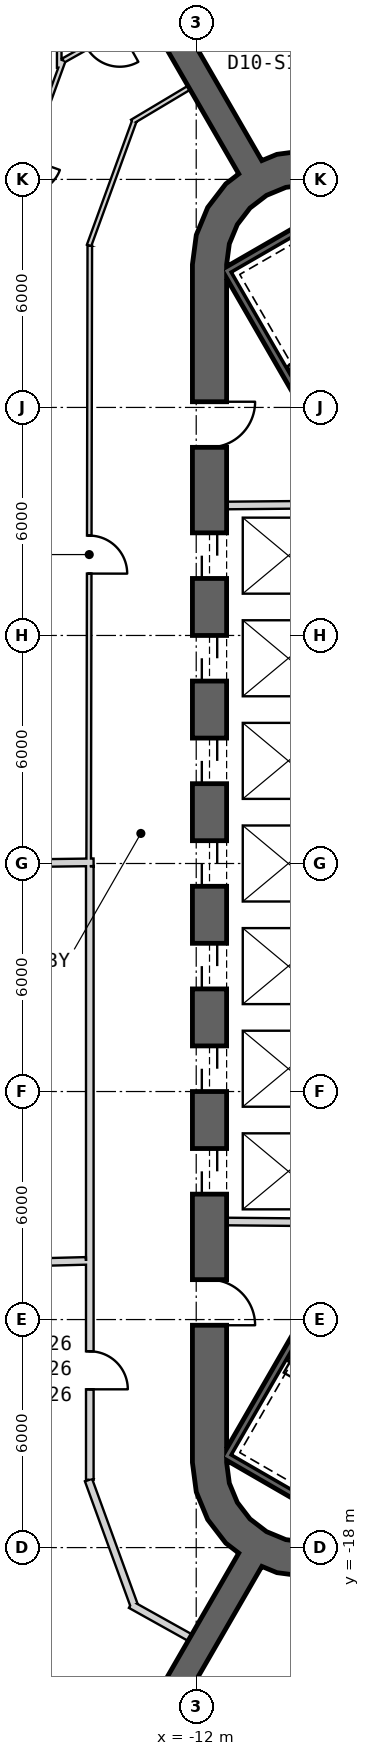
"""IFC4 building model, lengths in metres.
Left out: names, types, materials, properties, quantities, classifications, styles, units other than length and angle.
Written with IfcOpenShell. Run it as: python <this file> out.ifc"""

import sys

from ifc_helpers import new_model, si_unit, direction, frame, frame_2d, origin, place, context, subcontext, project, spatial, polyline, rectangle, outline, extrude, element, fill, save


model = new_model("IFC4")
c1 = context("Model", 3, precision=1e-05, world=origin(), true_north=direction((0.0, 1.0)))
c2 = subcontext(c1, "Body", "Model", "MODEL_VIEW")
j1 = project(units=[si_unit("LENGTHUNIT", "METRE"), si_unit("PLANEANGLEUNIT", "RADIAN")], contexts=[c1])
p1 = place(None, origin())
s1 = spatial("IfcSite", under=j1, at=p1, CompositionType="ELEMENT")
p2 = place(p1, origin())
s2 = spatial("IfcBuilding", under=s1, at=p2, CompositionType="ELEMENT")
p3 = place(p2, frame((0.0, 0.0, 217.2)))
s3 = spatial("IfcBuildingStorey", under=s2, at=p3, CompositionType="ELEMENT", Elevation=217.2)
p4 = place(p3, frame((-11.65, 15.762, 0.0), z_axis=(0.0, 0.0, 1.0), x_axis=(0.0, -1.0, 0.0)))
e1 = element("IfcWall", 1, at=p4, inside=s3, PredefinedType="SHEAR", context=c2, shape_type="SweptSolid", body=[
    extrude(rectangle(XDim=31.523, YDim=0.9, at=frame_2d((15.762, 0.0))), origin(), (0.0, 0.0, 1.0), 4.0),
])
p5 = place(p4, frame((7.062, 0.0, 0.0)))
e2 = element("IfcOpeningElement", 2, at=p5, cuts=e1, PredefinedType="OPENING", context=c2, shape_type="SweptSolid", body=[
    extrude(rectangle(XDim=1.2, YDim=2.4, at=frame_2d((0.6, 1.2))), frame((0.0, 0.46, 0.0), z_axis=(0.0, -1.0, 0.0), x_axis=(1.0, 0.0, 0.0)), (0.0, 0.0, 1.0), 0.92),
])
p6 = place(p4, frame((9.762, 0.0, 0.0)))
e3 = element("IfcOpeningElement", 3, at=p6, cuts=e1, PredefinedType="OPENING", context=c2, shape_type="SweptSolid", body=[
    extrude(rectangle(XDim=1.2, YDim=2.4, at=frame_2d((0.6, 1.2))), frame((0.0, 0.46, 0.0), z_axis=(0.0, -1.0, 0.0), x_axis=(1.0, 0.0, 0.0)), (0.0, 0.0, 1.0), 0.92),
])
p7 = place(p4, frame((12.462, 0.0, 0.0)))
e4 = element("IfcOpeningElement", 4, at=p7, cuts=e1, PredefinedType="OPENING", context=c2, shape_type="SweptSolid", body=[
    extrude(rectangle(XDim=1.2, YDim=2.4, at=frame_2d((0.6, 1.2))), frame((0.0, 0.46, 0.0), z_axis=(0.0, -1.0, 0.0), x_axis=(1.0, 0.0, 0.0)), (0.0, 0.0, 1.0), 0.92),
])
p8 = place(p4, frame((15.162, 0.0, 0.0)))
e5 = element("IfcOpeningElement", 5, at=p8, cuts=e1, PredefinedType="OPENING", context=c2, shape_type="SweptSolid", body=[
    extrude(rectangle(XDim=1.2, YDim=2.4, at=frame_2d((0.6, 1.2))), frame((0.0, 0.46, 0.0), z_axis=(0.0, -1.0, 0.0), x_axis=(1.0, 0.0, 0.0)), (0.0, 0.0, 1.0), 0.92),
])
p9 = place(p4, frame((17.862, 0.0, 0.0)))
e6 = element("IfcOpeningElement", 6, at=p9, cuts=e1, PredefinedType="OPENING", context=c2, shape_type="SweptSolid", body=[
    extrude(rectangle(XDim=1.2, YDim=2.4, at=frame_2d((0.6, 1.2))), frame((0.0, 0.46, 0.0), z_axis=(0.0, -1.0, 0.0), x_axis=(1.0, 0.0, 0.0)), (0.0, 0.0, 1.0), 0.92),
])
p10 = place(p4, frame((20.562, 0.0, 0.0)))
e7 = element("IfcOpeningElement", 7, at=p10, cuts=e1, PredefinedType="OPENING", context=c2, shape_type="SweptSolid", body=[
    extrude(rectangle(XDim=1.2, YDim=2.4, at=frame_2d((0.6, 1.2))), frame((0.0, 0.46, 0.0), z_axis=(0.0, -1.0, 0.0), x_axis=(1.0, 0.0, 0.0)), (0.0, 0.0, 1.0), 0.92),
])
p11 = place(p4, frame((23.262, 0.0, 0.0)))
e8 = element("IfcOpeningElement", 8, at=p11, cuts=e1, PredefinedType="OPENING", context=c2, shape_type="SweptSolid", body=[
    extrude(rectangle(XDim=1.2, YDim=2.4, at=frame_2d((0.6, 1.2))), frame((0.0, 0.46, 0.0), z_axis=(0.0, -1.0, 0.0), x_axis=(1.0, 0.0, 0.0)), (0.0, 0.0, 1.0), 0.92),
])
p12 = place(p4, frame((3.612, 0.0, 0.0)))
e9 = element("IfcOpeningElement", 9, at=p12, cuts=e1, PredefinedType="OPENING", context=c2, shape_type="SweptSolid", body=[
    extrude(rectangle(XDim=1.2, YDim=2.4, at=frame_2d((0.6, 1.2))), frame((0.0, 0.46, 0.0), z_axis=(0.0, -1.0, 0.0), x_axis=(1.0, 0.0, 0.0)), (0.0, 0.0, 1.0), 0.92),
])
p13 = place(p4, frame((26.712, 0.0, 0.0)))
e10 = element("IfcOpeningElement", 10, at=p13, cuts=e1, PredefinedType="OPENING", context=c2, shape_type="SweptSolid", body=[
    extrude(rectangle(XDim=1.2, YDim=2.4, at=frame_2d((0.6, 1.2))), frame((0.0, 0.46, 0.0), z_axis=(0.0, -1.0, 0.0), x_axis=(1.0, 0.0, 0.0)), (0.0, 0.0, 1.0), 0.92),
])
p14 = place(p3, origin())
e11 = element("IfcWall", 11, at=p14, inside=s3, PredefinedType="SHEAR", context=c2, shape_type="SweptSolid", body=[
    extrude(outline(polyline([(-7.6, 18.36), (-8.323, 18.659), (-9.1, 18.762), (-9.876, 18.659), (-10.6, 18.36), (-11.221, 17.883), (-11.698, 17.262), (-11.998, 16.538), (-12.1, 15.762), (-11.2, 15.762), (-11.128, 16.305), (-10.919, 16.812), (-10.585, 17.247), (-10.15, 17.58), (-9.644, 17.79), (-9.1, 17.862), (-8.556, 17.79), (-8.05, 17.58), (-7.6, 18.36)])), origin(), (0.0, 0.0, 1.0), 4.0),
])
p15 = place(p3, origin())
e12 = element("IfcWall", 12, at=p15, inside=s3, PredefinedType="SHEAR", context=c2, shape_type="SweptSolid", body=[
    extrude(outline(polyline([(-12.1, -15.762), (-11.998, -16.538), (-11.698, -17.262), (-11.221, -17.883), (-10.6, -18.36), (-9.876, -18.659), (-9.1, -18.762), (-8.323, -18.659), (-7.6, -18.36), (-8.05, -17.58), (-8.556, -17.79), (-9.1, -17.862), (-9.644, -17.79), (-10.15, -17.58), (-10.585, -17.247), (-10.919, -16.812), (-11.128, -16.305), (-11.2, -15.762), (-12.1, -15.762)])), origin(), (0.0, 0.0, 1.0), 4.0),
])
for number, where, z_axis, x_axis in (
    (13, (-10.575, 18.316, 0.0), (0.0, 0.0, 1.0), (-0.5, 0.866, 0.0)),
    (14, (-10.575, -18.316, 0.0), (0.0, 0.0, 1.0), (-0.5, -0.866, 0.0)),
):
    element("IfcWall", number, at=place(p3, frame(where, z_axis=z_axis, x_axis=x_axis)), inside=s3, PredefinedType="SHEAR", context=c2, shape_type="SweptSolid", body=[
        extrude(rectangle(XDim=11.581, YDim=0.7, at=frame_2d((5.791, 0.0))), origin(), (0.0, 0.0, 1.0), 4.0),
    ])
p16 = place(p3, frame((-11.2, 9.42, 0.0), z_axis=(0.0, 0.0, 1.0), x_axis=(0.999957167047, 0.009255488683, 0.0)))
e15 = element("IfcWall", 15, at=p16, inside=s3, PredefinedType="PLUMBINGWALL", context=c2, shape_type="SweptSolid", body=[
    extrude(rectangle(XDim=3.35, YDim=0.2, at=frame_2d((1.675, 0.0))), origin(), (0.0, 0.0, 1.0), 3.7),
])
p17 = place(p3, frame((-8.05, -9.449, 0.0), z_axis=(0.0, 0.0, 1.0), x_axis=(-0.999957467379, 0.009222983926, 0.0)))
e16 = element("IfcWall", 16, at=p17, inside=s3, PredefinedType="PLUMBINGWALL", context=c2, shape_type="SweptSolid", body=[
    extrude(rectangle(XDim=3.15, YDim=0.2, at=frame_2d((1.575, 0.0))), origin(), (0.0, 0.0, 1.0), 3.7),
])
p18 = place(p3, frame((-11.245, 15.678, -0.3), z_axis=(0.0, 0.0, 1.0), x_axis=(0.499977274689, -0.866038523851, 0.0)))
e17 = element("IfcWall", 17, at=p18, inside=s3, PredefinedType="SHEAR", context=c2, shape_type="SweptSolid", body=[
    extrude(rectangle(XDim=8.1, YDim=0.2, at=frame_2d((4.05, 0.0))), origin(), (0.0, 0.0, 1.0), 4.0),
])
for number, where, z_axis, x_axis in (
    (18, (-7.818, 17.541, -0.3), (0.0, 0.0, 1.0), (-0.866, -0.5, 0.0)),
    (19, (-11.282, -15.541, -0.3), (0.0, 0.0, 1.0), (0.866, -0.5, 0.0)),
):
    element("IfcWall", number, at=place(p3, frame(where, z_axis=z_axis, x_axis=x_axis)), inside=s3, PredefinedType="SHEAR", context=c2, shape_type="SweptSolid", body=[
        extrude(rectangle(XDim=3.8, YDim=0.2, at=frame_2d((1.9, 0.0))), origin(), (0.0, 0.0, 1.0), 4.0),
    ])
p19 = place(p3, frame((-7.196, -8.663, -0.3), z_axis=(0.0, 0.0, 1.0), x_axis=(-0.499997992926, -0.866026562566, 0.0)))
e20 = element("IfcWall", 20, at=p19, inside=s3, PredefinedType="SHEAR", context=c2, shape_type="SweptSolid", body=[
    extrude(rectangle(XDim=7.9, YDim=0.2, at=frame_2d((3.95, 0.0))), origin(), (0.0, 0.0, 1.0), 4.0),
])
p20 = place(p3, frame((-12.189, 20.411, 0.0), z_axis=(0.0, 0.0, 1.0), x_axis=(-0.858492721014, -0.51282574815, 0.0)))
e21 = element("IfcWall", 21, at=p20, inside=s3, PredefinedType="PARTITIONING", context=c2, shape_type="SweptSolid", body=[
    extrude(rectangle(XDim=1.742, YDim=0.12, at=frame_2d((0.871, 0.0))), origin(), (0.0, 0.0, 1.0), 3.7),
])
p21 = place(p3, frame((-13.631, 19.53, 0.0), z_axis=(0.0, 0.0, 1.0), x_axis=(-0.342069878069, -0.939674517329, 0.0)))
e22 = element("IfcWall", 22, at=p21, inside=s3, PredefinedType="PARTITIONING", context=c2, shape_type="SweptSolid", body=[
    extrude(rectangle(XDim=3.479, YDim=0.12, at=frame_2d((1.739, 0.0))), origin(), (0.0, 0.0, 1.0), 2.78),
])
p22 = place(p3, frame((-14.8, 16.257, 0.0), z_axis=(0.0, 0.0, 1.0), x_axis=(-0.001847148781, -0.999998294019, 0.0)))
e23 = element("IfcWall", 23, at=p22, inside=s3, PredefinedType="PARTITIONING", context=c2, shape_type="SweptSolid", body=[
    extrude(rectangle(XDim=16.257, YDim=0.12, at=frame_2d((8.128, 0.0))), origin(), (0.0, 0.0, 1.0), 2.88),
])
p23 = place(p22, frame((7.629, 0.0, 0.0)))
e24 = element("IfcOpeningElement", 24, at=p23, cuts=e23, PredefinedType="OPENING", context=c2, shape_type="SweptSolid", body=[
    extrude(rectangle(XDim=1.0, YDim=2.1, at=frame_2d((0.5, 1.05))), frame((0.0, 0.07, 0.0), z_axis=(0.0, -1.0, 0.0), x_axis=(1.0, 0.0, 0.0)), (0.0, 0.0, 1.0), 0.14),
])
p24 = place(p3, frame((-17.2, -0.001, 0.0), z_axis=(0.0, 0.0, 1.0), x_axis=(0.999915662945, 0.012987185857, 0.0)))
e25 = element("IfcWall", 25, at=p24, inside=s3, PredefinedType="PARTITIONING", context=c2, shape_type="SweptSolid", body=[
    extrude(rectangle(XDim=2.5, YDim=0.2, at=frame_2d((1.25, 0.0))), origin(), (0.0, 0.0, 1.0), 3.07),
])
p25 = place(p3, frame((-15.496, 21.129, 0.0), z_axis=(0.0, 0.0, 1.0), x_axis=(-0.342023613346, -0.939691357795, 0.0)))
e26 = element("IfcWall", 26, at=p25, inside=s3, PredefinedType="PARTITIONING", context=c2, shape_type="SweptSolid", body=[
    extrude(rectangle(XDim=1.747, YDim=0.12, at=frame_2d((0.873, 0.0))), origin(), (0.0, 0.0, 1.0), 2.78),
])
p26 = place(p3, frame((-13.313, 22.359, 0.0), z_axis=(0.0, 0.0, 1.0), x_axis=(-0.87126053708, -0.490820819167, 0.0)))
e27 = element("IfcWall", 27, at=p26, inside=s3, PredefinedType="PARTITIONING", context=c2, shape_type="SweptSolid", body=[
    extrude(rectangle(XDim=2.506, YDim=0.12, at=frame_2d((1.253, 0.0))), origin(), (0.0, 0.0, 1.0), 3.7),
])
p27 = place(p26, frame((0.803, 0.0, 0.0)))
e28 = element("IfcOpeningElement", 28, at=p27, cuts=e27, PredefinedType="OPENING", context=c2, shape_type="SweptSolid", body=[
    extrude(rectangle(XDim=1.0, YDim=2.1, at=frame_2d((0.5, 1.05))), frame((0.0, 0.07, 0.0), z_axis=(0.0, -1.0, 0.0), x_axis=(1.0, 0.0, 0.0)), (0.0, 0.0, 1.0), 0.14),
])
p28 = place(p3, frame((-13.722, -19.499, 0.0), z_axis=(0.0, 0.0, 1.0), x_axis=(0.873381780332, -0.487036205824, 0.0)))
e29 = element("IfcWall", 29, at=p28, inside=s3, PredefinedType="PARTITIONING", context=c2, shape_type="SweptSolid", body=[
    extrude(rectangle(XDim=1.785, YDim=0.2, at=frame_2d((0.892, 0.0))), origin(), (0.0, 0.0, 1.0), 3.7),
])
p29 = place(p3, frame((-14.834, -16.223, 0.0), z_axis=(0.0, 0.0, 1.0), x_axis=(0.342017717312, -0.939693503779, 0.0)))
e30 = element("IfcWall", 30, at=p29, inside=s3, PredefinedType="PARTITIONING", context=c2, shape_type="SweptSolid", body=[
    extrude(rectangle(XDim=3.497, YDim=0.2, at=frame_2d((1.749, 0.0))), origin(), (0.0, 0.0, 1.0), 2.78),
])
p30 = place(p3, frame((-14.8, -0.07, 0.0), z_axis=(0.0, 0.0, 1.0), x_axis=(0.0, -1.0, 0.0)))
e31 = element("IfcWall", 31, at=p30, inside=s3, PredefinedType="PARTITIONING", context=c2, shape_type="SweptSolid", body=[
    extrude(rectangle(XDim=16.147, YDim=0.2, at=frame_2d((8.073, 0.0))), origin(), (0.0, 0.0, 1.0), 2.88),
])
p31 = place(p30, frame((12.765, 0.0, 0.0)))
e32 = element("IfcOpeningElement", 32, at=p31, cuts=e31, PredefinedType="OPENING", context=c2, shape_type="SweptSolid", body=[
    extrude(rectangle(XDim=1.0, YDim=2.1, at=frame_2d((0.5, 1.05))), frame((0.0, 0.11, 0.0), z_axis=(0.0, -1.0, 0.0), x_axis=(1.0, 0.0, 0.0)), (0.0, 0.0, 1.0), 0.22),
])
p32 = place(p3, frame((-14.9, -10.456, 0.0), z_axis=(0.0, 0.0, 1.0), x_axis=(-0.999660259834, -0.026064629441, 0.0)))
e33 = element("IfcWall", 33, at=p32, inside=s3, PredefinedType="PARTITIONING", context=c2, shape_type="SweptSolid", body=[
    extrude(rectangle(XDim=14.191, YDim=0.2, at=frame_2d((7.095, 0.0))), origin(), (0.0, 0.0, 1.0), 2.98),
])
p33 = place(p3, frame((-15.605, 20.939, 0.0), z_axis=(0.0, 0.0, 1.0), x_axis=(0.001847571904, 0.999998293238, 0.0)))
e34 = element("IfcWall", 34, at=p33, inside=s3, PredefinedType="PARTITIONING", context=c2, shape_type="SweptSolid", body=[
    extrude(rectangle(XDim=2.643, YDim=0.12, at=frame_2d((1.321, 0.0))), origin(), (0.0, 0.0, 1.0), 3.7),
])
p34 = place(p23, origin())
e35 = element("IfcDoor", 35, at=p34, inside=s3, OperationType="SINGLE_SWING_RIGHT", PredefinedType="NOTDEFINED", context=c2, shape_type="SweptSolid", body=[
    extrude(rectangle(XDim=1.0, YDim=2.1, at=frame_2d((0.5, 1.05))), frame((0.0, 0.025, 0.0), z_axis=(0.0, -1.0, 0.0), x_axis=(1.0, 0.0, 0.0)), (0.0, 0.0, 1.0), 0.05),
])
fill(e24, e35)
p35 = place(p31, origin())
e36 = element("IfcDoor", 36, at=p35, inside=s3, OperationType="SINGLE_SWING_LEFT", PredefinedType="USERDEFINED", context=c2, shape_type="SweptSolid", body=[
    extrude(rectangle(XDim=1.0, YDim=2.1, at=frame_2d((0.5, 1.05))), frame((0.0, 0.025, 0.0), z_axis=(0.0, -1.0, 0.0), x_axis=(1.0, 0.0, 0.0)), (0.0, 0.0, 1.0), 0.05),
])
fill(e32, e36)
p36 = place(p5, origin())
e37 = element("IfcDoor", 37, at=p36, inside=s3, OperationType="SLIDING_TO_LEFT", PredefinedType="USERDEFINED", context=c2, shape_type="SweptSolid", body=[
    extrude(rectangle(XDim=1.2, YDim=2.4, at=frame_2d((0.6, 1.2))), frame((0.0, 0.025, 0.0), z_axis=(0.0, -1.0, 0.0), x_axis=(1.0, 0.0, 0.0)), (0.0, 0.0, 1.0), 0.05),
])
fill(e2, e37)
p37 = place(p6, origin())
e38 = element("IfcDoor", 38, at=p37, inside=s3, OperationType="SLIDING_TO_LEFT", PredefinedType="USERDEFINED", context=c2, shape_type="SweptSolid", body=[
    extrude(rectangle(XDim=1.2, YDim=2.4, at=frame_2d((0.6, 1.2))), frame((0.0, 0.025, 0.0), z_axis=(0.0, -1.0, 0.0), x_axis=(1.0, 0.0, 0.0)), (0.0, 0.0, 1.0), 0.05),
])
fill(e3, e38)
p38 = place(p7, origin())
e39 = element("IfcDoor", 39, at=p38, inside=s3, OperationType="SLIDING_TO_LEFT", PredefinedType="USERDEFINED", context=c2, shape_type="SweptSolid", body=[
    extrude(rectangle(XDim=1.2, YDim=2.4, at=frame_2d((0.6, 1.2))), frame((0.0, 0.025, 0.0), z_axis=(0.0, -1.0, 0.0), x_axis=(1.0, 0.0, 0.0)), (0.0, 0.0, 1.0), 0.05),
])
fill(e4, e39)
p39 = place(p8, origin())
e40 = element("IfcDoor", 40, at=p39, inside=s3, OperationType="SLIDING_TO_LEFT", PredefinedType="USERDEFINED", context=c2, shape_type="SweptSolid", body=[
    extrude(rectangle(XDim=1.2, YDim=2.4, at=frame_2d((0.6, 1.2))), frame((0.0, 0.025, 0.0), z_axis=(0.0, -1.0, 0.0), x_axis=(1.0, 0.0, 0.0)), (0.0, 0.0, 1.0), 0.05),
])
fill(e5, e40)
p40 = place(p9, origin())
e41 = element("IfcDoor", 41, at=p40, inside=s3, OperationType="SLIDING_TO_LEFT", PredefinedType="USERDEFINED", context=c2, shape_type="SweptSolid", body=[
    extrude(rectangle(XDim=1.2, YDim=2.4, at=frame_2d((0.6, 1.2))), frame((0.0, 0.025, 0.0), z_axis=(0.0, -1.0, 0.0), x_axis=(1.0, 0.0, 0.0)), (0.0, 0.0, 1.0), 0.05),
])
fill(e6, e41)
p41 = place(p10, origin())
e42 = element("IfcDoor", 42, at=p41, inside=s3, OperationType="SLIDING_TO_LEFT", PredefinedType="USERDEFINED", context=c2, shape_type="SweptSolid", body=[
    extrude(rectangle(XDim=1.2, YDim=2.4, at=frame_2d((0.6, 1.2))), frame((0.0, 0.025, 0.0), z_axis=(0.0, -1.0, 0.0), x_axis=(1.0, 0.0, 0.0)), (0.0, 0.0, 1.0), 0.05),
])
fill(e7, e42)
p42 = place(p11, origin())
e43 = element("IfcDoor", 43, at=p42, inside=s3, OperationType="SLIDING_TO_LEFT", PredefinedType="USERDEFINED", context=c2, shape_type="SweptSolid", body=[
    extrude(rectangle(XDim=1.2, YDim=2.4, at=frame_2d((0.6, 1.2))), frame((0.0, 0.025, 0.0), z_axis=(0.0, -1.0, 0.0), x_axis=(1.0, 0.0, 0.0)), (0.0, 0.0, 1.0), 0.05),
])
fill(e8, e43)
p43 = place(p12, origin())
e44 = element("IfcDoor", 44, at=p43, inside=s3, OperationType="SINGLE_SWING_LEFT", PredefinedType="USERDEFINED", context=c2, shape_type="SweptSolid", body=[
    extrude(rectangle(XDim=1.2, YDim=2.4, at=frame_2d((0.6, 1.2))), frame((0.0, 0.025, 0.0), z_axis=(0.0, -1.0, 0.0), x_axis=(1.0, 0.0, 0.0)), (0.0, 0.0, 1.0), 0.05),
])
fill(e9, e44)
p44 = place(p13, origin())
e45 = element("IfcDoor", 45, at=p44, inside=s3, OperationType="SINGLE_SWING_LEFT", PredefinedType="USERDEFINED", context=c2, shape_type="SweptSolid", body=[
    extrude(rectangle(XDim=1.2, YDim=2.4, at=frame_2d((0.6, 1.2))), frame((0.0, 0.025, 0.0), z_axis=(0.0, -1.0, 0.0), x_axis=(1.0, 0.0, 0.0)), (0.0, 0.0, 1.0), 0.05),
])
fill(e10, e45)
save(model, sys.argv[1])
